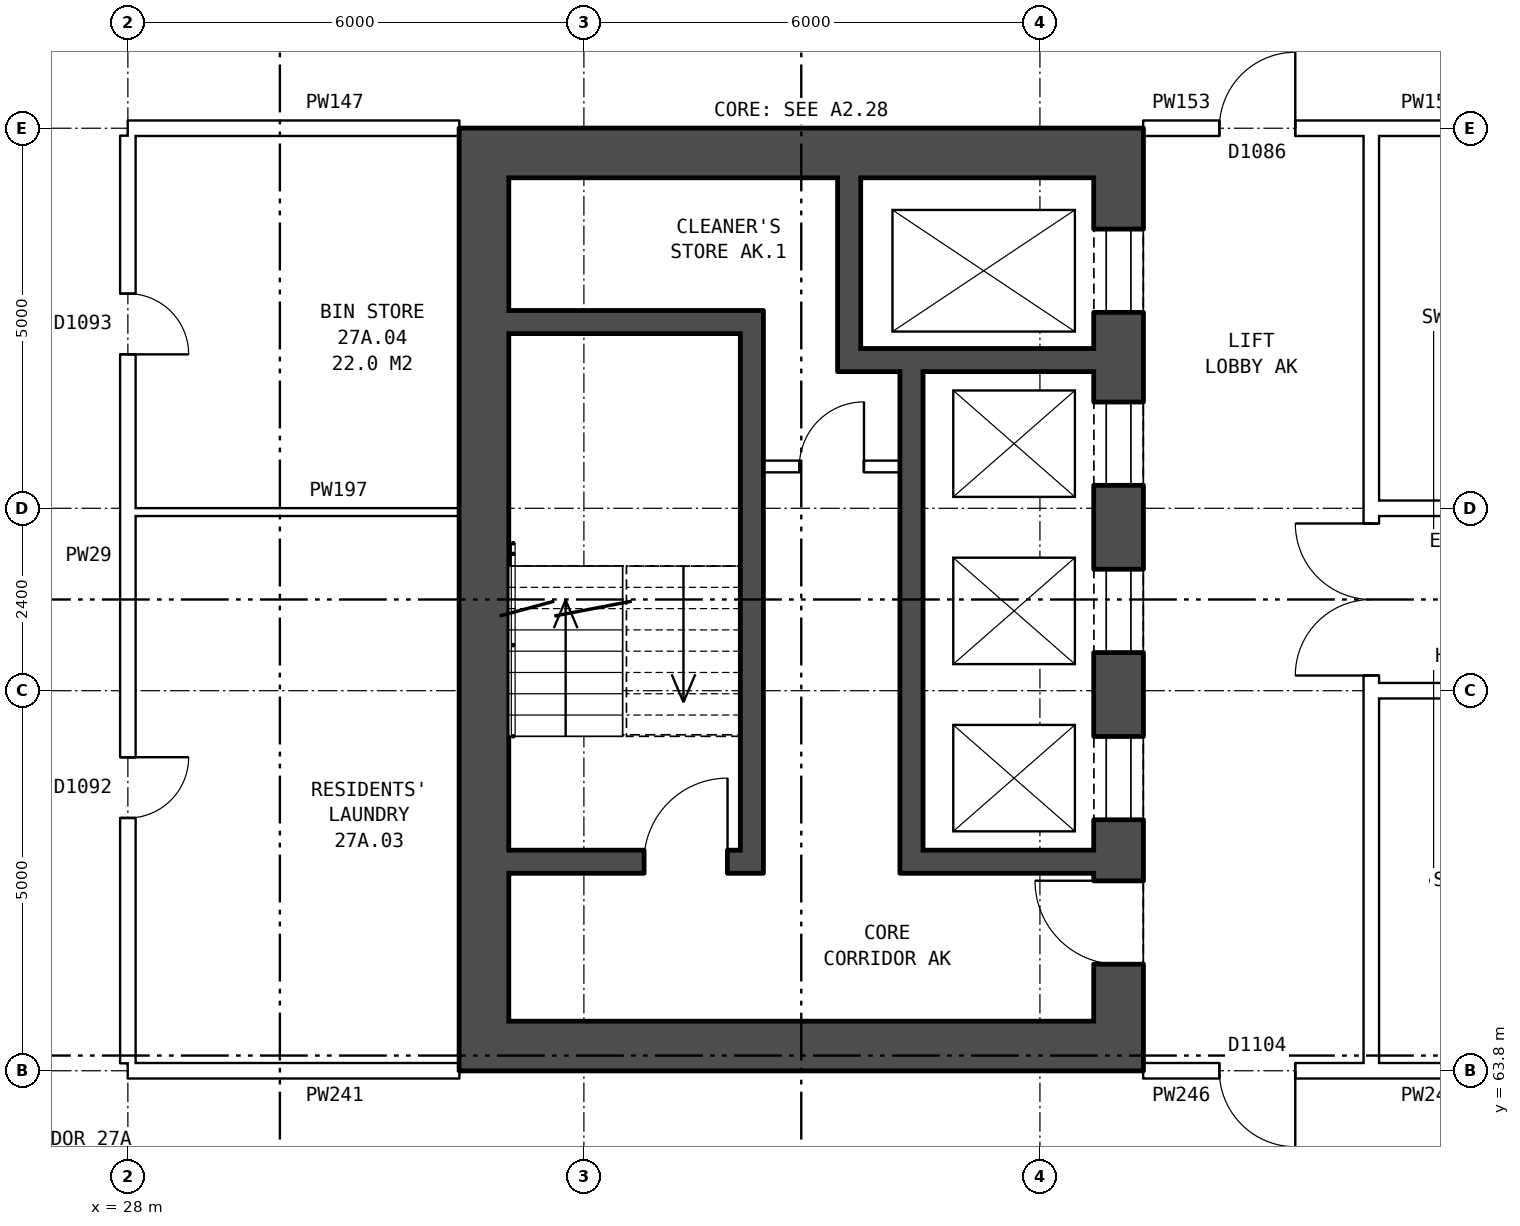
"""IFC4 building model, lengths in metres.
Left out: names, types, materials, properties, quantities, classifications, styles, units other than length and angle.
Written with IfcOpenShell. Run it as: python <this file> out.ifc"""

import sys

from ifc_helpers import new_model, si_unit, direction, frame, frame_2d, origin, place, context, subcontext, project, spatial, rectangle, extrude, element, fill, save


model = new_model("IFC4")
c1 = context("Model", 3, precision=1e-05, world=origin(), true_north=direction((0.0, 1.0)))
c2 = subcontext(c1, "Body", "Model", "MODEL_VIEW")
j1 = project(units=[si_unit("LENGTHUNIT", "METRE"), si_unit("PLANEANGLEUNIT", "RADIAN")], contexts=[c1])
p1 = place(None, origin())
s1 = spatial("IfcSite", under=j1, at=p1, CompositionType="ELEMENT")
p2 = place(p1, origin())
s2 = spatial("IfcBuilding", under=s1, at=p2, CompositionType="ELEMENT")
p3 = place(p2, frame((0.0, 0.0, 99.5)))
s3 = spatial("IfcBuildingStorey", under=s2, at=p3, CompositionType="ELEMENT", Elevation=99.5)
p4 = place(p3, frame((41.035, 75.55, 0.0), z_axis=(0.0, 0.0, 1.0), x_axis=(0.0, -1.0, 0.0)))
e1 = element("IfcWall", 1, at=p4, inside=s3, PredefinedType="SHEAR", context=c2, shape_type="SweptSolid", body=[
    extrude(rectangle(XDim=11.1, YDim=0.65, at=frame_2d((5.55, 0.0))), origin(), (0.0, 0.0, 1.0), 2.85),
])
p5 = place(p4, frame((0.675, 0.0, 0.0)))
e2 = element("IfcOpeningElement", 2, at=p5, cuts=e1, PredefinedType="OPENING", context=c2, shape_type="SweptSolid", body=[
    extrude(rectangle(XDim=1.1, YDim=2.1, at=frame_2d((0.55, 1.05))), frame((0.0, 0.335, 0.0), z_axis=(0.0, -1.0, 0.0), x_axis=(1.0, 0.0, 0.0)), (0.0, 0.0, 1.0), 0.67),
])
p6 = place(p4, frame((2.95, 0.0, 0.0)))
e3 = element("IfcOpeningElement", 3, at=p6, cuts=e1, PredefinedType="OPENING", context=c2, shape_type="SweptSolid", body=[
    extrude(rectangle(XDim=1.1, YDim=2.1, at=frame_2d((0.55, 1.05))), frame((0.0, 0.335, 0.0), z_axis=(0.0, -1.0, 0.0), x_axis=(1.0, 0.0, 0.0)), (0.0, 0.0, 1.0), 0.67),
])
p7 = place(p4, frame((5.15, 0.0, 0.0)))
e4 = element("IfcOpeningElement", 4, at=p7, cuts=e1, PredefinedType="OPENING", context=c2, shape_type="SweptSolid", body=[
    extrude(rectangle(XDim=1.1, YDim=2.1, at=frame_2d((0.55, 1.05))), frame((0.0, 0.335, 0.0), z_axis=(0.0, -1.0, 0.0), x_axis=(1.0, 0.0, 0.0)), (0.0, 0.0, 1.0), 0.67),
])
p8 = place(p4, frame((7.35, 0.0, 0.0)))
e5 = element("IfcOpeningElement", 5, at=p8, cuts=e1, PredefinedType="OPENING", context=c2, shape_type="SweptSolid", body=[
    extrude(rectangle(XDim=1.1, YDim=2.1, at=frame_2d((0.55, 1.05))), frame((0.0, 0.335, 0.0), z_axis=(0.0, -1.0, 0.0), x_axis=(1.0, 0.0, 0.0)), (0.0, 0.0, 1.0), 0.67),
])
p9 = place(p4, frame((9.25, 0.0, 0.0)))
e6 = element("IfcOpeningElement", 6, at=p9, cuts=e1, PredefinedType="OPENING", context=c2, shape_type="SweptSolid", body=[
    extrude(rectangle(XDim=1.1, YDim=2.1, at=frame_2d((0.55, 1.05))), frame((0.0, 0.335, 0.0), z_axis=(0.0, -1.0, 0.0), x_axis=(1.0, 0.0, 0.0)), (0.0, 0.0, 1.0), 0.67),
])
p10 = place(p3, frame((32.685, 75.55, 0.0), z_axis=(0.0, 0.0, 1.0), x_axis=(0.0, -1.0, 0.0)))
e7 = element("IfcWall", 7, at=p10, inside=s3, PredefinedType="SHEAR", context=c2, shape_type="SweptSolid", body=[
    extrude(rectangle(XDim=11.1, YDim=0.65, at=frame_2d((5.55, 0.0))), origin(), (0.0, 0.0, 1.0), 2.85),
])
for number, where, z_axis, x_axis in (
    (8, (41.36, 75.875, 0.0), (0.0, 0.0, 1.0), (-1.0, 0.0, 0.0)),
    (9, (41.36, 64.125, 0.0), (0.0, 0.0, 1.0), (-1.0, 0.0, 0.0)),
):
    element("IfcWall", number, at=place(p3, frame(where, z_axis=z_axis, x_axis=x_axis)), inside=s3, PredefinedType="SHEAR", context=c2, shape_type="SweptSolid", body=[
        extrude(rectangle(XDim=9.0, YDim=0.65, at=frame_2d((4.5, 0.0))), origin(), (0.0, 0.0, 1.0), 2.85),
    ])
p11 = place(p3, frame((36.06, 73.65, 0.0), z_axis=(0.0, 0.0, 1.0), x_axis=(-1.0, 0.0, 0.0)))
e10 = element("IfcWall", 10, at=p11, inside=s3, PredefinedType="SHEAR", context=c2, shape_type="SweptSolid", body=[
    extrude(rectangle(XDim=3.05, YDim=0.3, at=frame_2d((1.525, 0.0))), origin(), (0.0, 0.0, 1.0), 2.85),
])
p12 = place(p3, frame((40.71, 73.15, 0.0), z_axis=(0.0, 0.0, 1.0), x_axis=(-1.0, 0.0, 0.0)))
e11 = element("IfcWall", 11, at=p12, inside=s3, PredefinedType="SHEAR", context=c2, shape_type="SweptSolid", body=[
    extrude(rectangle(XDim=3.37, YDim=0.3, at=frame_2d((1.685, 0.0))), origin(), (0.0, 0.0, 1.0), 2.85),
])
p13 = place(p3, frame((38.16, 71.75, 0.0), z_axis=(0.0, 0.0, 1.0), x_axis=(-1.0, 0.0, 0.0)))
e12 = element("IfcWall", 12, at=p13, inside=s3, PredefinedType="PARTITIONING", context=c2, shape_type="SweptSolid", body=[
    extrude(rectangle(XDim=1.8, YDim=0.15, at=frame_2d((0.9, 0.0))), origin(), (0.0, 0.0, 1.0), 2.85),
])
p14 = place(p13, frame((0.475, 0.0, 0.0)))
e13 = element("IfcOpeningElement", 13, at=p14, cuts=e12, PredefinedType="OPENING", context=c2, shape_type="SweptSolid", body=[
    extrude(rectangle(XDim=0.85, YDim=2.1, at=frame_2d((0.425, 1.05))), frame((0.0, 0.085, 0.0), z_axis=(0.0, -1.0, 0.0), x_axis=(1.0, 0.0, 0.0)), (0.0, 0.0, 1.0), 0.17),
])
p15 = place(p3, frame((40.71, 66.55, 0.0), z_axis=(0.0, 0.0, 1.0), x_axis=(-1.0, 0.0, 0.0)))
e14 = element("IfcWall", 14, at=p15, inside=s3, PredefinedType="SHEAR", context=c2, shape_type="SweptSolid", body=[
    extrude(rectangle(XDim=2.25, YDim=0.3, at=frame_2d((1.125, 0.0))), origin(), (0.0, 0.0, 1.0), 2.85),
])
p16 = place(p3, frame((36.06, 66.55, 0.0), z_axis=(0.0, 0.0, 1.0), x_axis=(-1.0, 0.0, 0.0)))
e15 = element("IfcWall", 15, at=p16, inside=s3, PredefinedType="SHEAR", context=c2, shape_type="SweptSolid", body=[
    extrude(rectangle(XDim=3.05, YDim=0.3, at=frame_2d((1.525, 0.0))), origin(), (0.0, 0.0, 1.0), 2.85),
])
p17 = place(p16, frame((0.17, 0.0, 0.0)))
e16 = element("IfcOpeningElement", 16, at=p17, cuts=e15, PredefinedType="OPENING", context=c2, shape_type="SweptSolid", body=[
    extrude(rectangle(XDim=1.1, YDim=2.1, at=frame_2d((0.55, 1.05))), frame((0.0, 0.16, 0.0), z_axis=(0.0, -1.0, 0.0), x_axis=(1.0, 0.0, 0.0)), (0.0, 0.0, 1.0), 0.32),
])
p18 = place(p3, frame((38.31, 73.0, 0.0), z_axis=(0.0, 0.0, 1.0), x_axis=(0.0, -1.0, 0.0)))
e17 = element("IfcWall", 17, at=p18, inside=s3, PredefinedType="SHEAR", context=c2, shape_type="SweptSolid", body=[
    extrude(rectangle(XDim=6.6, YDim=0.3, at=frame_2d((3.3, 0.0))), origin(), (0.0, 0.0, 1.0), 2.85),
])
p19 = place(p3, frame((37.49, 75.55, 0.0), z_axis=(0.0, 0.0, 1.0), x_axis=(0.0, -1.0, 0.0)))
e18 = element("IfcWall", 18, at=p19, inside=s3, PredefinedType="SHEAR", context=c2, shape_type="SweptSolid", body=[
    extrude(rectangle(XDim=2.25, YDim=0.3, at=frame_2d((1.125, 0.0))), origin(), (0.0, 0.0, 1.0), 2.85),
])
p20 = place(p3, frame((36.21, 73.8, 0.0), z_axis=(0.0, 0.0, 1.0), x_axis=(0.0, -1.0, 0.0)))
e19 = element("IfcWall", 19, at=p20, inside=s3, PredefinedType="SHEAR", context=c2, shape_type="SweptSolid", body=[
    extrude(rectangle(XDim=7.4, YDim=0.3, at=frame_2d((3.7, 0.0))), origin(), (0.0, 0.0, 1.0), 2.85),
])
p21 = place(p3, frame((44.36, 63.9, 0.0), z_axis=(0.0, 0.0, 1.0), x_axis=(0.0, 1.0, 0.0)))
e20 = element("IfcWall", 20, at=p21, inside=s3, PredefinedType="PARTITIONING", context=c2, shape_type="SweptSolid", body=[
    extrude(rectangle(XDim=12.2, YDim=0.2, at=frame_2d((6.1, 0.0))), origin(), (0.0, 0.0, 1.0), 2.85),
])
p22 = place(p21, frame((5.1, 0.0, 0.0)))
e21 = element("IfcOpeningElement", 21, at=p22, cuts=e20, PredefinedType="OPENING", context=c2, shape_type="SweptSolid", body=[
    extrude(rectangle(XDim=2.0, YDim=2.1, at=frame_2d((1.0, 1.05))), frame((0.0, 0.11, 0.0), z_axis=(0.0, -1.0, 0.0), x_axis=(1.0, 0.0, 0.0)), (0.0, 0.0, 1.0), 0.22),
])
p23 = place(p3, frame((28.0, 63.8, 0.0), z_axis=(0.0, 0.0, 1.0), x_axis=(1.0, 0.0, 0.0)))
e22 = element("IfcWall", 22, at=p23, inside=s3, PredefinedType="PARTITIONING", context=c2, shape_type="SweptSolid", body=[
    extrude(rectangle(XDim=4.36, YDim=0.2, at=frame_2d((2.18, 0.0))), origin(), (0.0, 0.0, 1.0), 2.85),
])
p24 = place(p3, frame((41.36, 63.8, 0.0), z_axis=(0.0, 0.0, 1.0), x_axis=(1.0, 0.0, 0.0)))
e23 = element("IfcWall", 23, at=p24, inside=s3, PredefinedType="PARTITIONING", context=c2, shape_type="SweptSolid", body=[
    extrude(rectangle(XDim=3.0, YDim=0.2, at=frame_2d((1.5, 0.0))), origin(), (0.0, 0.0, 1.0), 2.85),
])
p25 = place(p24, frame((1.0, 0.0, 0.0)))
e24 = element("IfcOpeningElement", 24, at=p25, cuts=e23, PredefinedType="OPENING", context=c2, shape_type="SweptSolid", body=[
    extrude(rectangle(XDim=1.0, YDim=2.1, at=frame_2d((0.5, 1.05))), frame((0.0, 0.11, 0.0), z_axis=(0.0, -1.0, 0.0), x_axis=(1.0, 0.0, 0.0)), (0.0, 0.0, 1.0), 0.22),
])
p26 = place(p3, frame((44.36, 63.8, 0.0), z_axis=(0.0, 0.0, 1.0), x_axis=(1.0, 0.0, 0.0)))
e25 = element("IfcWall", 25, at=p26, inside=s3, PredefinedType="PARTITIONING", context=c2, shape_type="SweptSolid", body=[
    extrude(rectangle(XDim=1.54, YDim=0.2, at=frame_2d((0.77, 0.0))), origin(), (0.0, 0.0, 1.0), 2.85),
])
p27 = place(p3, frame((44.36, 68.8, 0.0), z_axis=(0.0, 0.0, 1.0), x_axis=(1.0, 0.0, 0.0)))
e26 = element("IfcWall", 26, at=p27, inside=s3, PredefinedType="PARTITIONING", context=c2, shape_type="SweptSolid", body=[
    extrude(rectangle(XDim=19.28, YDim=0.2, at=frame_2d((9.64, 0.0))), origin(), (0.0, 0.0, 1.0), 2.85),
])
p28 = place(p27, frame((14.64, 0.0, 0.0)))
e27 = element("IfcOpeningElement", 27, at=p28, cuts=e26, PredefinedType="OPENING", context=c2, shape_type="SweptSolid", body=[
    extrude(rectangle(XDim=1.0, YDim=2.1, at=frame_2d((0.5, 1.05))), frame((0.0, 0.11, 0.0), z_axis=(0.0, -1.0, 0.0), x_axis=(1.0, 0.0, 0.0)), (0.0, 0.0, 1.0), 0.22),
])
p29 = place(p27, frame((11.64, 0.0, 0.0)))
e28 = element("IfcOpeningElement", 28, at=p29, cuts=e26, PredefinedType="OPENING", context=c2, shape_type="SweptSolid", body=[
    extrude(rectangle(XDim=1.0, YDim=2.1, at=frame_2d((0.5, 1.05))), frame((0.0, 0.11, 0.0), z_axis=(0.0, -1.0, 0.0), x_axis=(1.0, 0.0, 0.0)), (0.0, 0.0, 1.0), 0.22),
])
p30 = place(p27, frame((5.64, 0.0, 0.0)))
e29 = element("IfcOpeningElement", 29, at=p30, cuts=e26, PredefinedType="OPENING", context=c2, shape_type="SweptSolid", body=[
    extrude(rectangle(XDim=1.0, YDim=2.1, at=frame_2d((0.5, 1.05))), frame((0.0, 0.11, 0.0), z_axis=(0.0, -1.0, 0.0), x_axis=(1.0, 0.0, 0.0)), (0.0, 0.0, 1.0), 0.22),
])
p31 = place(p3, frame((28.1, 71.15, 0.0), z_axis=(0.0, 0.0, 1.0), x_axis=(1.0, 0.0, 0.0)))
e30 = element("IfcWall", 30, at=p31, inside=s3, PredefinedType="PARTITIONING", context=c2, shape_type="SweptSolid", body=[
    extrude(rectangle(XDim=4.26, YDim=0.1, at=frame_2d((2.13, 0.0))), origin(), (0.0, 0.0, 1.0), 2.85),
])
p32 = place(p3, frame((44.36, 71.2, 0.0), z_axis=(0.0, 0.0, 1.0), x_axis=(1.0, 0.0, 0.0)))
e31 = element("IfcWall", 31, at=p32, inside=s3, PredefinedType="PARTITIONING", context=c2, shape_type="SweptSolid", body=[
    extrude(rectangle(XDim=19.28, YDim=0.2, at=frame_2d((9.64, 0.0))), origin(), (0.0, 0.0, 1.0), 2.85),
])
p33 = place(p32, frame((14.64, 0.0, 0.0)))
e32 = element("IfcOpeningElement", 32, at=p33, cuts=e31, PredefinedType="OPENING", context=c2, shape_type="SweptSolid", body=[
    extrude(rectangle(XDim=1.0, YDim=2.1, at=frame_2d((0.5, 1.05))), frame((0.0, 0.11, 0.0), z_axis=(0.0, -1.0, 0.0), x_axis=(1.0, 0.0, 0.0)), (0.0, 0.0, 1.0), 0.22),
])
p34 = place(p32, frame((5.64, 0.0, 0.0)))
e33 = element("IfcOpeningElement", 33, at=p34, cuts=e31, PredefinedType="OPENING", context=c2, shape_type="SweptSolid", body=[
    extrude(rectangle(XDim=1.0, YDim=2.1, at=frame_2d((0.5, 1.05))), frame((0.0, 0.11, 0.0), z_axis=(0.0, -1.0, 0.0), x_axis=(1.0, 0.0, 0.0)), (0.0, 0.0, 1.0), 0.22),
])
p35 = place(p3, frame((28.0, 76.2, 0.0), z_axis=(0.0, 0.0, 1.0), x_axis=(1.0, 0.0, 0.0)))
e34 = element("IfcWall", 34, at=p35, inside=s3, PredefinedType="PARTITIONING", context=c2, shape_type="SweptSolid", body=[
    extrude(rectangle(XDim=4.36, YDim=0.2, at=frame_2d((2.18, 0.0))), origin(), (0.0, 0.0, 1.0), 2.85),
])
p36 = place(p3, frame((41.36, 76.2, 0.0), z_axis=(0.0, 0.0, 1.0), x_axis=(1.0, 0.0, 0.0)))
e35 = element("IfcWall", 35, at=p36, inside=s3, PredefinedType="PARTITIONING", context=c2, shape_type="SweptSolid", body=[
    extrude(rectangle(XDim=3.0, YDim=0.2, at=frame_2d((1.5, 0.0))), origin(), (0.0, 0.0, 1.0), 2.85),
])
p37 = place(p36, frame((1.0, 0.0, 0.0)))
e36 = element("IfcOpeningElement", 36, at=p37, cuts=e35, PredefinedType="OPENING", context=c2, shape_type="SweptSolid", body=[
    extrude(rectangle(XDim=1.0, YDim=2.1, at=frame_2d((0.5, 1.05))), frame((0.0, 0.11, 0.0), z_axis=(0.0, -1.0, 0.0), x_axis=(1.0, 0.0, 0.0)), (0.0, 0.0, 1.0), 0.22),
])
p38 = place(p3, frame((44.36, 76.2, 0.0), z_axis=(0.0, 0.0, 1.0), x_axis=(1.0, 0.0, 0.0)))
e37 = element("IfcWall", 37, at=p38, inside=s3, PredefinedType="PARTITIONING", context=c2, shape_type="SweptSolid", body=[
    extrude(rectangle(XDim=1.54, YDim=0.2, at=frame_2d((0.77, 0.0))), origin(), (0.0, 0.0, 1.0), 2.85),
])
p39 = place(p3, frame((28.0, 63.9, 0.0), z_axis=(0.0, 0.0, 1.0), x_axis=(0.0, 1.0, 0.0)))
e38 = element("IfcWall", 38, at=p39, inside=s3, PredefinedType="PARTITIONING", context=c2, shape_type="SweptSolid", body=[
    extrude(rectangle(XDim=12.2, YDim=0.2, at=frame_2d((6.1, 0.0))), origin(), (0.0, 0.0, 1.0), 2.85),
])
p40 = place(p39, frame((3.225, 0.0, 0.0)))
e39 = element("IfcOpeningElement", 39, at=p40, cuts=e38, PredefinedType="OPENING", context=c2, shape_type="SweptSolid", body=[
    extrude(rectangle(XDim=0.8, YDim=2.1, at=frame_2d((0.4, 1.05))), frame((0.0, 0.11, 0.0), z_axis=(0.0, -1.0, 0.0), x_axis=(1.0, 0.0, 0.0)), (0.0, 0.0, 1.0), 0.22),
])
p41 = place(p39, frame((9.325, 0.0, 0.0)))
e40 = element("IfcOpeningElement", 40, at=p41, cuts=e38, PredefinedType="OPENING", context=c2, shape_type="SweptSolid", body=[
    extrude(rectangle(XDim=0.8, YDim=2.1, at=frame_2d((0.4, 1.05))), frame((0.0, 0.11, 0.0), z_axis=(0.0, -1.0, 0.0), x_axis=(1.0, 0.0, 0.0)), (0.0, 0.0, 1.0), 0.22),
])
p42 = place(p5, origin())
e41 = element("IfcDoor", 41, at=p42, inside=s3, OperationType="DOUBLE_DOOR_SLIDING", PredefinedType="DOOR", context=c2, shape_type="SweptSolid", body=[
    extrude(rectangle(XDim=1.1, YDim=2.1, at=frame_2d((0.55, 1.05))), frame((0.0, -0.26, 0.0), z_axis=(0.0, -1.0, 0.0), x_axis=(1.0, 0.0, 0.0)), (0.0, 0.0, 1.0), 0.05),
])
fill(e2, e41)
p43 = place(p6, origin())
e42 = element("IfcDoor", 42, at=p43, inside=s3, OperationType="DOUBLE_DOOR_SLIDING", PredefinedType="DOOR", context=c2, shape_type="SweptSolid", body=[
    extrude(rectangle(XDim=1.1, YDim=2.1, at=frame_2d((0.55, 1.05))), frame((0.0, -0.26, 0.0), z_axis=(0.0, -1.0, 0.0), x_axis=(1.0, 0.0, 0.0)), (0.0, 0.0, 1.0), 0.05),
])
fill(e3, e42)
p44 = place(p7, origin())
e43 = element("IfcDoor", 43, at=p44, inside=s3, OperationType="DOUBLE_DOOR_SLIDING", PredefinedType="DOOR", context=c2, shape_type="SweptSolid", body=[
    extrude(rectangle(XDim=1.1, YDim=2.1, at=frame_2d((0.55, 1.05))), frame((0.0, -0.26, 0.0), z_axis=(0.0, -1.0, 0.0), x_axis=(1.0, 0.0, 0.0)), (0.0, 0.0, 1.0), 0.05),
])
fill(e4, e43)
p45 = place(p8, origin())
e44 = element("IfcDoor", 44, at=p45, inside=s3, OperationType="DOUBLE_DOOR_SLIDING", PredefinedType="DOOR", context=c2, shape_type="SweptSolid", body=[
    extrude(rectangle(XDim=1.1, YDim=2.1, at=frame_2d((0.55, 1.05))), frame((0.0, -0.26, 0.0), z_axis=(0.0, -1.0, 0.0), x_axis=(1.0, 0.0, 0.0)), (0.0, 0.0, 1.0), 0.05),
])
fill(e5, e44)
p46 = place(p9, frame((1.1, 0.0, 0.0), z_axis=(0.0, 0.0, 1.0), x_axis=(-1.0, 0.0, 0.0)))
e45 = element("IfcDoor", 45, at=p46, inside=s3, OperationType="SINGLE_SWING_RIGHT", PredefinedType="DOOR", context=c2, shape_type="SweptSolid", body=[
    extrude(rectangle(XDim=1.1, YDim=2.1, at=frame_2d((0.55, 1.05))), frame((0.0, 0.31, 0.0), z_axis=(0.0, -1.0, 0.0), x_axis=(1.0, 0.0, 0.0)), (0.0, 0.0, 1.0), 0.05),
])
fill(e6, e45)
p47 = place(p17, frame((1.1, 0.0, 0.0), z_axis=(0.0, 0.0, 1.0), x_axis=(-1.0, 0.0, 0.0)))
e46 = element("IfcDoor", 46, at=p47, inside=s3, OperationType="SINGLE_SWING_RIGHT", PredefinedType="DOOR", context=c2, shape_type="SweptSolid", body=[
    extrude(rectangle(XDim=1.1, YDim=2.1, at=frame_2d((0.55, 1.05))), frame((0.0, 0.025, 0.0), z_axis=(0.0, -1.0, 0.0), x_axis=(1.0, 0.0, 0.0)), (0.0, 0.0, 1.0), 0.05),
])
fill(e16, e46)
p48 = place(p14, frame((0.85, 0.0, 0.0), z_axis=(0.0, 0.0, 1.0), x_axis=(-1.0, 0.0, 0.0)))
e47 = element("IfcDoor", 47, at=p48, inside=s3, OperationType="SINGLE_SWING_RIGHT", PredefinedType="DOOR", context=c2, shape_type="SweptSolid", body=[
    extrude(rectangle(XDim=0.85, YDim=2.1, at=frame_2d((0.425, 1.05))), frame((0.0, 0.025, 0.0), z_axis=(0.0, -1.0, 0.0), x_axis=(1.0, 0.0, 0.0)), (0.0, 0.0, 1.0), 0.05),
])
fill(e13, e47)
p49 = place(p22, origin())
e48 = element("IfcDoor", 48, at=p49, inside=s3, OperationType="DOUBLE_DOOR_SINGLE_SWING", PredefinedType="DOOR", context=c2, shape_type="SweptSolid", body=[
    extrude(rectangle(XDim=2.0, YDim=2.1, at=frame_2d((1.0, 1.05))), frame((0.0, 0.025, 0.0), z_axis=(0.0, -1.0, 0.0), x_axis=(1.0, 0.0, 0.0)), (0.0, 0.0, 1.0), 0.05),
])
fill(e21, e48)
p50 = place(p25, frame((1.0, 0.0, 0.0), z_axis=(0.0, 0.0, 1.0), x_axis=(-1.0, 0.0, 0.0)))
e49 = element("IfcDoor", 49, at=p50, inside=s3, OperationType="SINGLE_SWING_LEFT", PredefinedType="DOOR", context=c2, shape_type="SweptSolid", body=[
    extrude(rectangle(XDim=1.0, YDim=2.1, at=frame_2d((0.5, 1.05))), frame((0.0, 0.025, 0.0), z_axis=(0.0, -1.0, 0.0), x_axis=(1.0, 0.0, 0.0)), (0.0, 0.0, 1.0), 0.05),
])
fill(e24, e49)
p51 = place(p37, origin())
e50 = element("IfcDoor", 50, at=p51, inside=s3, OperationType="SINGLE_SWING_RIGHT", PredefinedType="DOOR", context=c2, shape_type="SweptSolid", body=[
    extrude(rectangle(XDim=1.0, YDim=2.1, at=frame_2d((0.5, 1.05))), frame((0.0, 0.025, 0.0), z_axis=(0.0, -1.0, 0.0), x_axis=(1.0, 0.0, 0.0)), (0.0, 0.0, 1.0), 0.05),
])
fill(e36, e50)
p52 = place(p40, frame((0.8, 0.0, 0.0), z_axis=(0.0, 0.0, 1.0), x_axis=(-1.0, 0.0, 0.0)))
e51 = element("IfcDoor", 51, at=p52, inside=s3, OperationType="SINGLE_SWING_LEFT", PredefinedType="DOOR", context=c2, shape_type="SweptSolid", body=[
    extrude(rectangle(XDim=0.8, YDim=2.1, at=frame_2d((0.4, 1.05))), frame((0.0, 0.025, 0.0), z_axis=(0.0, -1.0, 0.0), x_axis=(1.0, 0.0, 0.0)), (0.0, 0.0, 1.0), 0.05),
])
fill(e39, e51)
p53 = place(p41, frame((0.8, 0.0, 0.0), z_axis=(0.0, 0.0, 1.0), x_axis=(-1.0, 0.0, 0.0)))
e52 = element("IfcDoor", 52, at=p53, inside=s3, OperationType="SINGLE_SWING_RIGHT", PredefinedType="DOOR", context=c2, shape_type="SweptSolid", body=[
    extrude(rectangle(XDim=0.8, YDim=2.1, at=frame_2d((0.4, 1.05))), frame((0.0, 0.025, 0.0), z_axis=(0.0, -1.0, 0.0), x_axis=(1.0, 0.0, 0.0)), (0.0, 0.0, 1.0), 0.05),
])
fill(e40, e52)
save(model, sys.argv[1])
